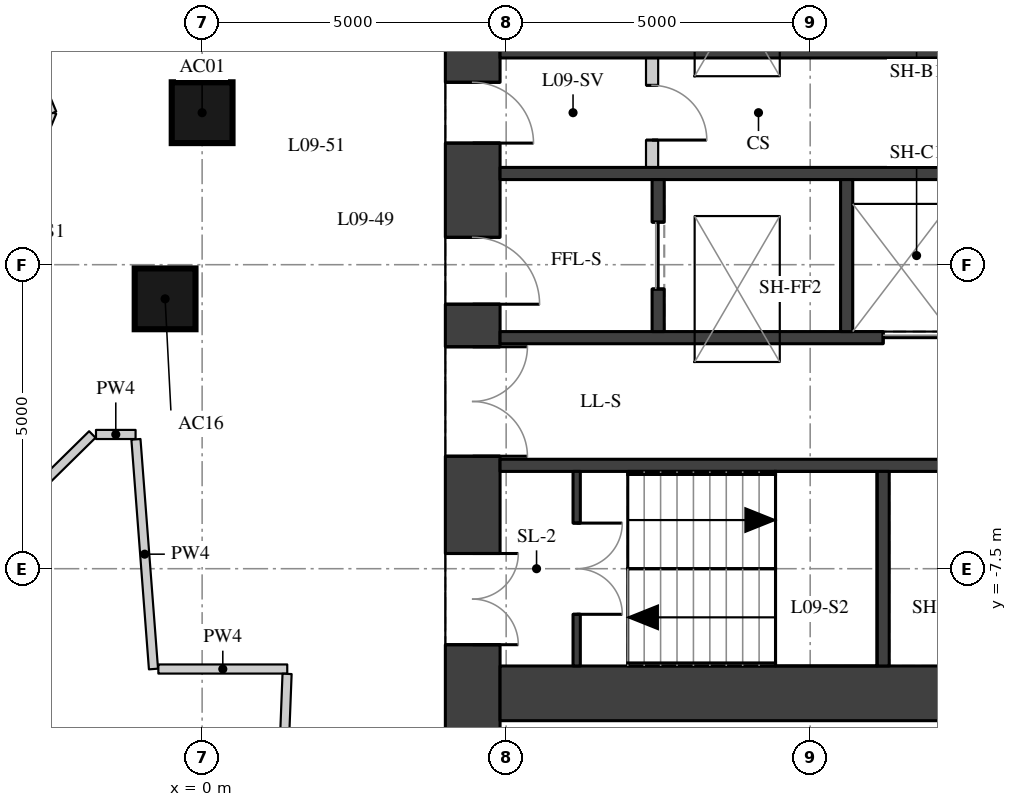
"""IFC4 building model, lengths in metres.
Left out: names, types, materials, properties, quantities, classifications, styles, units other than length and angle.
Written with IfcOpenShell. Run it as: python <this file> out.ifc"""

import sys

from ifc_helpers import new_model, si_unit, direction, frame, frame_2d, origin, origin_2d, place, context, subcontext, project, spatial, rectangle, extrude, element, fill, save


model = new_model("IFC4")
c1 = context("Model", 3, precision=1e-05, world=origin(), true_north=direction((0.0, 1.0)))
c2 = subcontext(c1, "Body", "Model", "MODEL_VIEW")
j1 = project(units=[si_unit("LENGTHUNIT", "METRE"), si_unit("PLANEANGLEUNIT", "RADIAN")], contexts=[c1])
p1 = place(None, origin())
s1 = spatial("IfcSite", under=j1, at=p1, CompositionType="ELEMENT")
p2 = place(p1, origin())
s2 = spatial("IfcBuilding", under=s1, at=p2, CompositionType="ELEMENT")
p3 = place(p2, frame((0.0, 0.0, 38.2)))
s3 = spatial("IfcBuildingStorey", under=s2, at=p3, CompositionType="ELEMENT", Elevation=38.2)
for number, where, z_axis, x_axis in (
    (1, (0.0, 0.0, 0.0), (0.0, 0.0, 1.0), (1.0, 0.0, 0.0)),
    (2, (-0.609, -3.062, 0.0), (0.0, 0.0, 1.0), (1.0, 0.0, 0.0)),
):
    element("IfcColumn", number, at=place(p3, frame(where, z_axis=z_axis, x_axis=x_axis)), inside=s3, PredefinedType="COLUMN", context=c2, shape_type="SweptSolid", body=[
        extrude(rectangle(XDim=1.0, YDim=1.0, at=origin_2d()), origin(), (0.0, 0.0, 1.0), 3.3),
    ])
p4 = place(p3, frame((4.45, -11.1, 0.0), z_axis=(0.0, 0.0, 1.0), x_axis=(0.0, 1.0, 0.0)))
e3 = element("IfcWall", 3, at=p4, inside=s3, PredefinedType="SHEAR", context=c2, shape_type="SweptSolid", body=[
    extrude(rectangle(XDim=22.2, YDim=0.9, at=frame_2d((11.1, 0.0))), origin(), (0.0, 0.0, 1.0), 3.02),
])
p5 = place(p4, frame((2.35, 0.0, 0.0)))
e4 = element("IfcOpeningElement", 4, at=p5, cuts=e3, PredefinedType="OPENING", context=c2, shape_type="SweptSolid", body=[
    extrude(rectangle(XDim=1.5, YDim=2.1, at=frame_2d((0.75, 1.05))), frame((0.0, 0.46, 0.0), z_axis=(0.0, -1.0, 0.0), x_axis=(1.0, 0.0, 0.0)), (0.0, 0.0, 1.0), 0.92),
])
p6 = place(p4, frame((5.45, 0.0, 0.0)))
e5 = element("IfcOpeningElement", 5, at=p6, cuts=e3, PredefinedType="OPENING", context=c2, shape_type="SweptSolid", body=[
    extrude(rectangle(XDim=1.8, YDim=2.1, at=frame_2d((0.9, 1.05))), frame((0.0, 0.46, 0.0), z_axis=(0.0, -1.0, 0.0), x_axis=(1.0, 0.0, 0.0)), (0.0, 0.0, 1.0), 0.92),
])
p7 = place(p4, frame((7.95, 0.0, 0.0)))
e6 = element("IfcOpeningElement", 6, at=p7, cuts=e3, PredefinedType="OPENING", context=c2, shape_type="SweptSolid", body=[
    extrude(rectangle(XDim=1.1, YDim=2.1, at=frame_2d((0.55, 1.05))), frame((0.0, 0.46, 0.0), z_axis=(0.0, -1.0, 0.0), x_axis=(1.0, 0.0, 0.0)), (0.0, 0.0, 1.0), 0.92),
])
p8 = place(p4, frame((10.6, 0.0, 0.0)))
e7 = element("IfcOpeningElement", 7, at=p8, cuts=e3, PredefinedType="OPENING", context=c2, shape_type="SweptSolid", body=[
    extrude(rectangle(XDim=1.0, YDim=2.1, at=frame_2d((0.5, 1.05))), frame((0.0, 0.46, 0.0), z_axis=(0.0, -1.0, 0.0), x_axis=(1.0, 0.0, 0.0)), (0.0, 0.0, 1.0), 0.92),
])
p9 = place(p4, frame((13.15, 0.0, 0.0)))
e8 = element("IfcOpeningElement", 8, at=p9, cuts=e3, PredefinedType="OPENING", context=c2, shape_type="SweptSolid", body=[
    extrude(rectangle(XDim=1.1, YDim=2.1, at=frame_2d((0.55, 1.05))), frame((0.0, 0.46, 0.0), z_axis=(0.0, -1.0, 0.0), x_axis=(1.0, 0.0, 0.0)), (0.0, 0.0, 1.0), 0.92),
])
p10 = place(p4, frame((14.95, 0.0, 0.0)))
e9 = element("IfcOpeningElement", 9, at=p10, cuts=e3, PredefinedType="OPENING", context=c2, shape_type="SweptSolid", body=[
    extrude(rectangle(XDim=1.8, YDim=2.1, at=frame_2d((0.9, 1.05))), frame((0.0, 0.46, 0.0), z_axis=(0.0, -1.0, 0.0), x_axis=(1.0, 0.0, 0.0)), (0.0, 0.0, 1.0), 0.92),
])
p11 = place(p4, frame((18.35, 0.0, 0.0)))
e10 = element("IfcOpeningElement", 10, at=p11, cuts=e3, PredefinedType="OPENING", context=c2, shape_type="SweptSolid", body=[
    extrude(rectangle(XDim=1.5, YDim=2.1, at=frame_2d((0.75, 1.05))), frame((0.0, 0.46, 0.0), z_axis=(0.0, -1.0, 0.0), x_axis=(1.0, 0.0, 0.0)), (0.0, 0.0, 1.0), 0.92),
])
p12 = place(p3, frame((4.9, -9.55, 0.0), z_axis=(0.0, 0.0, 1.0), x_axis=(1.0, 0.0, 0.0)))
e11 = element("IfcWall", 11, at=p12, inside=s3, PredefinedType="SHEAR", context=c2, shape_type="SweptSolid", body=[
    extrude(rectangle(XDim=10.2, YDim=0.9, at=frame_2d((5.1, 0.0))), origin(), (0.0, 0.0, 1.0), 3.02),
])
for number, where, z_axis, x_axis in (
    (12, (4.9, 1.0, 0.0), (0.0, 0.0, 1.0), (1.0, 0.0, 0.0)),
    (13, (4.9, -1.0, 0.0), (0.0, 0.0, 1.0), (1.0, 0.0, 0.0)),
):
    element("IfcWall", number, at=place(p3, frame(where, z_axis=z_axis, x_axis=x_axis)), inside=s3, PredefinedType="SHEAR", context=c2, shape_type="SweptSolid", body=[
        extrude(rectangle(XDim=10.2, YDim=0.2, at=frame_2d((5.1, 0.0))), origin(), (0.0, 0.0, 1.0), 3.02),
    ])
p13 = place(p3, frame((4.9, -3.7, 0.0), z_axis=(0.0, 0.0, 1.0), x_axis=(1.0, 0.0, 0.0)))
e14 = element("IfcWall", 14, at=p13, inside=s3, PredefinedType="SHEAR", context=c2, shape_type="SweptSolid", body=[
    extrude(rectangle(XDim=10.2, YDim=0.2, at=frame_2d((5.1, 0.0))), origin(), (0.0, 0.0, 1.0), 3.02),
])
p14 = place(p13, frame((6.3, 0.0, 0.0)))
e15 = element("IfcOpeningElement", 15, at=p14, cuts=e14, PredefinedType="OPENING", context=c2, shape_type="SweptSolid", body=[
    extrude(rectangle(XDim=1.1, YDim=2.1, at=frame_2d((0.55, 1.05))), frame((0.0, 0.11, 0.0), z_axis=(0.0, -1.0, 0.0), x_axis=(1.0, 0.0, 0.0)), (0.0, 0.0, 1.0), 0.22),
])
p15 = place(p13, frame((8.6, 0.0, 0.0)))
e16 = element("IfcOpeningElement", 16, at=p15, cuts=e14, PredefinedType="OPENING", context=c2, shape_type="SweptSolid", body=[
    extrude(rectangle(XDim=1.1, YDim=2.1, at=frame_2d((0.55, 1.05))), frame((0.0, 0.11, 0.0), z_axis=(0.0, -1.0, 0.0), x_axis=(1.0, 0.0, 0.0)), (0.0, 0.0, 1.0), 0.22),
])
p16 = place(p3, frame((4.9, -5.8, 0.0), z_axis=(0.0, 0.0, 1.0), x_axis=(1.0, 0.0, 0.0)))
e17 = element("IfcWall", 17, at=p16, inside=s3, PredefinedType="SHEAR", context=c2, shape_type="SweptSolid", body=[
    extrude(rectangle(XDim=10.2, YDim=0.2, at=frame_2d((5.1, 0.0))), origin(), (0.0, 0.0, 1.0), 3.02),
])
p17 = place(p3, frame((11.2, -9.1, 0.0), z_axis=(0.0, 0.0, 1.0), x_axis=(0.0, 1.0, 0.0)))
e18 = element("IfcWall", 18, at=p17, inside=s3, PredefinedType="SHEAR", context=c2, shape_type="SweptSolid", body=[
    extrude(rectangle(XDim=3.2, YDim=0.2, at=frame_2d((1.6, 0.0))), origin(), (0.0, 0.0, 1.0), 3.02),
])
p18 = place(p3, frame((7.5, -3.6, 0.0), z_axis=(0.0, 0.0, 1.0), x_axis=(0.0, 1.0, 0.0)))
e19 = element("IfcWall", 19, at=p18, inside=s3, PredefinedType="SHEAR", context=c2, shape_type="SweptSolid", body=[
    extrude(rectangle(XDim=2.5, YDim=0.2, at=frame_2d((1.25, 0.0))), origin(), (0.0, 0.0, 1.0), 3.02),
])
p19 = place(p18, frame((0.7, 0.0, 0.0)))
e20 = element("IfcOpeningElement", 20, at=p19, cuts=e19, PredefinedType="OPENING", context=c2, shape_type="SweptSolid", body=[
    extrude(rectangle(XDim=1.1, YDim=2.1, at=frame_2d((0.55, 1.05))), frame((0.0, 0.11, 0.0), z_axis=(0.0, -1.0, 0.0), x_axis=(1.0, 0.0, 0.0)), (0.0, 0.0, 1.0), 0.22),
])
p20 = place(p3, frame((10.6, -3.6, 0.0), z_axis=(0.0, 0.0, 1.0), x_axis=(0.0, 1.0, 0.0)))
e21 = element("IfcWall", 21, at=p20, inside=s3, PredefinedType="SHEAR", context=c2, shape_type="SweptSolid", body=[
    extrude(rectangle(XDim=2.5, YDim=0.2, at=frame_2d((1.25, 0.0))), origin(), (0.0, 0.0, 1.0), 3.02),
])
p21 = place(p3, frame((6.16, -9.1, 0.0), z_axis=(0.0, 0.0, 1.0), x_axis=(0.0, 1.0, 0.0)))
e22 = element("IfcWall", 22, at=p21, inside=s3, PredefinedType="SHEAR", context=c2, shape_type="SweptSolid", body=[
    extrude(rectangle(XDim=3.2, YDim=0.12, at=frame_2d((1.6, 0.0))), origin(), (0.0, 0.0, 1.0), 3.02),
])
p22 = place(p21, frame((0.85, 0.0, 0.0)))
e23 = element("IfcOpeningElement", 23, at=p22, cuts=e22, PredefinedType="OPENING", context=c2, shape_type="SweptSolid", body=[
    extrude(rectangle(XDim=1.5, YDim=2.1, at=frame_2d((0.75, 1.05))), frame((0.0, 0.07, 0.0), z_axis=(0.0, -1.0, 0.0), x_axis=(1.0, 0.0, 0.0)), (0.0, 0.0, 1.0), 0.14),
])
p23 = place(p3, frame((7.4, -0.9, 0.0), z_axis=(0.0, 0.0, 1.0), x_axis=(0.0, 1.0, 0.0)))
e24 = element("IfcWall", 24, at=p23, inside=s3, PredefinedType="PARTITIONING", context=c2, shape_type="SweptSolid", body=[
    extrude(rectangle(XDim=1.8, YDim=0.2, at=frame_2d((0.9, 0.0))), origin(), (0.0, 0.0, 1.0), 3.02),
])
p24 = place(p23, frame((0.45, 0.0, 0.0)))
e25 = element("IfcOpeningElement", 25, at=p24, cuts=e24, PredefinedType="OPENING", context=c2, shape_type="SweptSolid", body=[
    extrude(rectangle(XDim=0.9, YDim=2.1, at=frame_2d((0.45, 1.05))), frame((0.0, 0.11, 0.0), z_axis=(0.0, -1.0, 0.0), x_axis=(1.0, 0.0, 0.0)), (0.0, 0.0, 1.0), 0.22),
])
p25 = place(p3, frame((-3.779, -7.234, 0.0), z_axis=(0.0, 0.0, 1.0), x_axis=(0.712684144815, 0.701485074487, 0.0)))
e26 = element("IfcWall", 26, at=p25, inside=s3, PredefinedType="PARTITIONING", context=c2, shape_type="SweptSolid", body=[
    extrude(rectangle(XDim=2.769, YDim=0.15, at=frame_2d((1.384, 0.0))), origin(), (0.0, 0.0, 1.0), 3.02),
])
p26 = place(p3, frame((-1.746, -5.292, 0.0), z_axis=(0.0, 0.0, 1.0), x_axis=(1.0, 0.0, 0.0)))
e27 = element("IfcWall", 27, at=p26, inside=s3, PredefinedType="PARTITIONING", context=c2, shape_type="SweptSolid", body=[
    extrude(rectangle(XDim=0.651, YDim=0.15, at=frame_2d((0.326, 0.0))), origin(), (0.0, 0.0, 1.0), 3.02),
])
p27 = place(p3, frame((-1.089, -5.372, 0.0), z_axis=(0.0, 0.0, 1.0), x_axis=(0.076169209517, -0.997094905975, 0.0)))
e28 = element("IfcWall", 28, at=p27, inside=s3, PredefinedType="PARTITIONING", context=c2, shape_type="SweptSolid", body=[
    extrude(rectangle(XDim=3.789, YDim=0.15, at=frame_2d((1.894, 0.0))), origin(), (0.0, 0.0, 1.0), 3.02),
])
p28 = place(p3, frame((-0.72, -9.15, 0.0), z_axis=(0.0, 0.0, 1.0), x_axis=(1.0, 0.0, 0.0)))
e29 = element("IfcWall", 29, at=p28, inside=s3, PredefinedType="PARTITIONING", context=c2, shape_type="SweptSolid", body=[
    extrude(rectangle(XDim=2.12, YDim=0.15, at=frame_2d((1.06, 0.0))), origin(), (0.0, 0.0, 1.0), 3.02),
])
p29 = place(p3, frame((1.397, -9.23, 0.0), z_axis=(0.0, 0.0, 1.0), x_axis=(-0.038741742932, -0.99924925687, 0.0)))
e30 = element("IfcWall", 30, at=p29, inside=s3, PredefinedType="PARTITIONING", context=c2, shape_type="SweptSolid", body=[
    extrude(rectangle(XDim=4.922, YDim=0.15, at=frame_2d((2.461, 0.0))), origin(), (0.0, 0.0, 1.0), 3.02),
])
for number, where, z_axis, x_axis in (
    (31, (-2.446, 0.0, 0.0), (0.0, 0.0, 1.0), (-0.383, -0.924, 0.0)),
    (32, (-4.073, 3.927, 0.0), (0.0, 0.0, 1.0), (0.383, -0.924, 0.0)),
):
    element("IfcWall", number, at=place(p3, frame(where, z_axis=z_axis, x_axis=x_axis)), inside=s3, PredefinedType="PARTITIONING", context=c2, shape_type="SweptSolid", body=[
        extrude(rectangle(XDim=4.251, YDim=0.1, at=frame_2d((2.125, 0.0))), origin(), (0.0, 0.0, 1.0), 3.02),
    ])
p30 = place(p5, origin())
e33 = element("IfcDoor", 33, at=p30, inside=s3, OperationType="DOUBLE_DOOR_SINGLE_SWING", PredefinedType="DOOR", context=c2, shape_type="SweptSolid", body=[
    extrude(rectangle(XDim=1.5, YDim=2.1, at=frame_2d((0.75, 1.05))), frame((0.0, 0.025, 0.0), z_axis=(0.0, -1.0, 0.0), x_axis=(1.0, 0.0, 0.0)), (0.0, 0.0, 1.0), 0.05),
])
fill(e4, e33)
p31 = place(p6, origin())
e34 = element("IfcDoor", 34, at=p31, inside=s3, OperationType="DOUBLE_DOOR_SINGLE_SWING", PredefinedType="DOOR", context=c2, shape_type="SweptSolid", body=[
    extrude(rectangle(XDim=1.8, YDim=2.1, at=frame_2d((0.9, 1.05))), frame((0.0, 0.025, 0.0), z_axis=(0.0, -1.0, 0.0), x_axis=(1.0, 0.0, 0.0)), (0.0, 0.0, 1.0), 0.05),
])
fill(e5, e34)
p32 = place(p7, origin())
e35 = element("IfcDoor", 35, at=p32, inside=s3, OperationType="SINGLE_SWING_RIGHT", PredefinedType="DOOR", context=c2, shape_type="SweptSolid", body=[
    extrude(rectangle(XDim=1.1, YDim=2.1, at=frame_2d((0.55, 1.05))), frame((0.0, 0.025, 0.0), z_axis=(0.0, -1.0, 0.0), x_axis=(1.0, 0.0, 0.0)), (0.0, 0.0, 1.0), 0.05),
])
fill(e6, e35)
p33 = place(p8, origin())
e36 = element("IfcDoor", 36, at=p33, inside=s3, OperationType="SINGLE_SWING_RIGHT", PredefinedType="DOOR", context=c2, shape_type="SweptSolid", body=[
    extrude(rectangle(XDim=1.0, YDim=2.1, at=frame_2d((0.5, 1.05))), frame((0.0, 0.025, 0.0), z_axis=(0.0, -1.0, 0.0), x_axis=(1.0, 0.0, 0.0)), (0.0, 0.0, 1.0), 0.05),
])
fill(e7, e36)
p34 = place(p22, origin())
e37 = element("IfcDoor", 37, at=p34, inside=s3, OperationType="DOUBLE_DOOR_SINGLE_SWING", PredefinedType="DOOR", context=c2, shape_type="SweptSolid", body=[
    extrude(rectangle(XDim=1.5, YDim=2.1, at=frame_2d((0.75, 1.05))), frame((0.0, 0.025, 0.0), z_axis=(0.0, -1.0, 0.0), x_axis=(1.0, 0.0, 0.0)), (0.0, 0.0, 1.0), 0.05),
])
fill(e23, e37)
p35 = place(p14, origin())
e38 = element("IfcDoor", 38, at=p35, inside=s3, OperationType="DOUBLE_DOOR_SLIDING", PredefinedType="DOOR", context=c2, shape_type="SweptSolid", body=[
    extrude(rectangle(XDim=1.1, YDim=2.1, at=frame_2d((0.55, 1.05))), frame((0.0, 0.025, 0.0), z_axis=(0.0, -1.0, 0.0), x_axis=(1.0, 0.0, 0.0)), (0.0, 0.0, 1.0), 0.05),
])
fill(e15, e38)
p36 = place(p19, origin())
e39 = element("IfcDoor", 39, at=p36, inside=s3, OperationType="DOUBLE_DOOR_SLIDING", PredefinedType="DOOR", context=c2, shape_type="SweptSolid", body=[
    extrude(rectangle(XDim=1.1, YDim=2.1, at=frame_2d((0.55, 1.05))), frame((0.0, 0.025, 0.0), z_axis=(0.0, -1.0, 0.0), x_axis=(1.0, 0.0, 0.0)), (0.0, 0.0, 1.0), 0.05),
])
fill(e20, e39)
p37 = place(p24, origin())
e40 = element("IfcDoor", 40, at=p37, inside=s3, OperationType="SINGLE_SWING_RIGHT", PredefinedType="DOOR", context=c2, shape_type="SweptSolid", body=[
    extrude(rectangle(XDim=0.9, YDim=2.1, at=frame_2d((0.45, 1.05))), frame((0.0, 0.025, 0.0), z_axis=(0.0, -1.0, 0.0), x_axis=(1.0, 0.0, 0.0)), (0.0, 0.0, 1.0), 0.05),
])
fill(e25, e40)
save(model, sys.argv[1])
